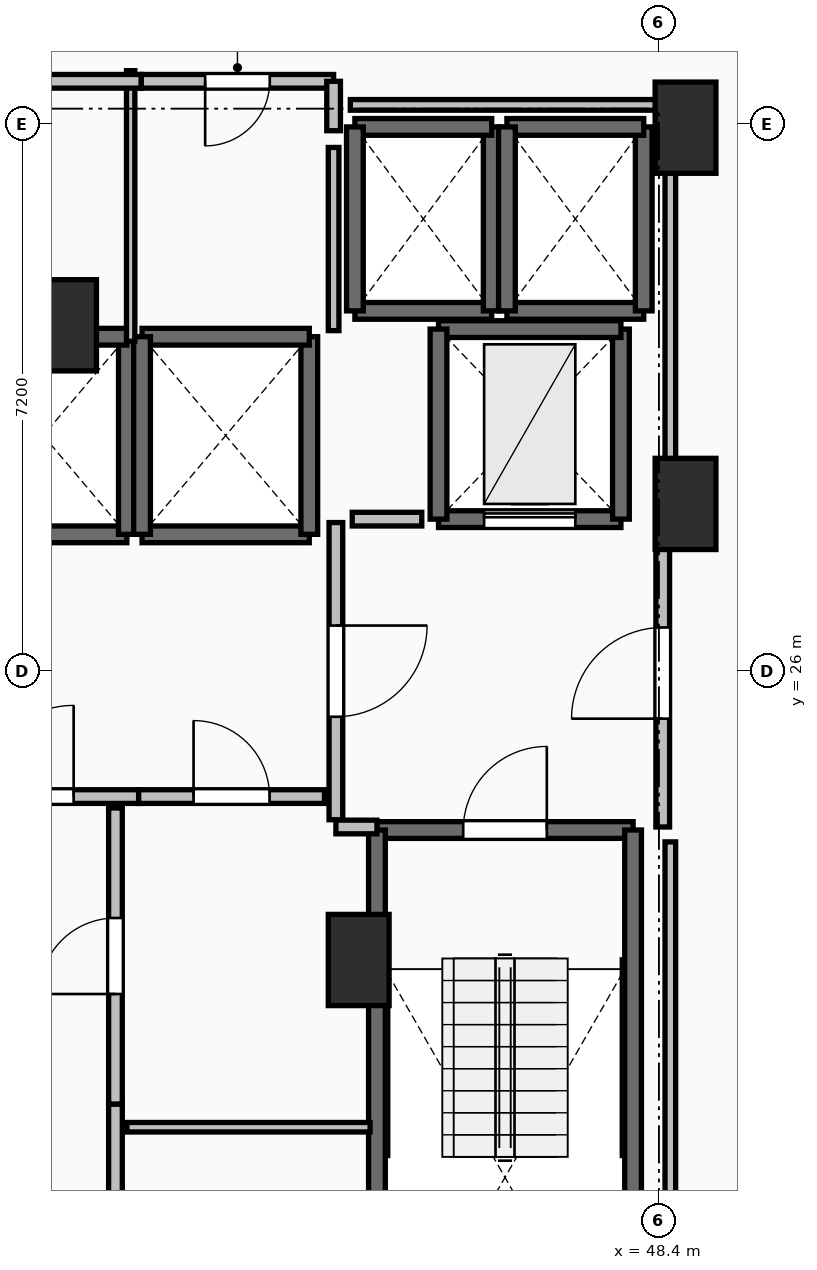
"""IFC4 building model, lengths in metres.
Left out: names, types, materials, properties, quantities, classifications, styles, units other than length and angle.
Written with IfcOpenShell. Run it as: python <this file> out.ifc"""

import sys

from ifc_helpers import new_model, si_unit, direction, frame, frame_2d, origin, origin_2d, place, context, subcontext, project, spatial, rectangle, extrude, element, fill, save


model = new_model("IFC4")
c1 = context("Model", 3, precision=1e-05, world=origin(), true_north=direction((0.0, 1.0)))
c2 = subcontext(c1, "Body", "Model", "MODEL_VIEW")
j1 = project(units=[si_unit("LENGTHUNIT", "METRE"), si_unit("PLANEANGLEUNIT", "RADIAN")], contexts=[c1])
p1 = place(None, origin())
s1 = spatial("IfcSite", under=j1, at=p1, CompositionType="ELEMENT")
p2 = place(p1, origin())
s2 = spatial("IfcBuilding", under=s1, at=p2, CompositionType="ELEMENT")
p3 = place(p2, frame((0.0, 0.0, 132.6)))
s3 = spatial("IfcBuildingStorey", under=s2, at=p3, CompositionType="ELEMENT", Elevation=132.6)
for number, where, z_axis, x_axis in (
    (1, (48.75, 33.15, 0.0), (0.0, 0.0, 1.0), (1.0, 0.0, 0.0)),
    (2, (48.75, 28.2, 0.0), (0.0, 0.0, 1.0), (1.0, 0.0, 0.0)),
    (3, (44.45, 22.2, 0.0), (0.0, 0.0, 1.0), (1.0, 0.0, 0.0)),
    (4, (40.6, 30.55, 0.0), (0.0, 0.0, 1.0), (1.0, 0.0, 0.0)),
):
    element("IfcColumn", number, at=place(p3, frame(where, z_axis=z_axis, x_axis=x_axis)), inside=s3, PredefinedType="PILASTER", context=c2, shape_type="SweptSolid", body=[
        extrude(rectangle(XDim=0.8, YDim=1.2, at=origin_2d()), origin(), (0.0, 0.0, 1.0), 3.5),
    ])
p4 = place(p3, frame((44.69, 23.91, 0.0), z_axis=(0.0, 0.0, 1.0), x_axis=(1.0, 0.0, 0.0)))
e5 = element("IfcWall", 5, at=p4, inside=s3, PredefinedType="SOLIDWALL", context=c2, shape_type="SweptSolid", body=[
    extrude(rectangle(XDim=3.37, YDim=0.22, at=frame_2d((1.685, 0.0))), origin(), (0.0, 0.0, 1.0), 3.24),
])
p5 = place(p4, frame((1.135, 0.0, 0.0)))
e6 = element("IfcOpeningElement", 6, at=p5, cuts=e5, PredefinedType="OPENING", context=c2, shape_type="SweptSolid", body=[
    extrude(rectangle(XDim=1.1, YDim=2.15, at=frame_2d((0.55, 1.075))), frame((0.0, 0.125, 0.0), z_axis=(0.0, -1.0, 0.0), x_axis=(1.0, 0.0, 0.0)), (0.0, 0.0, 1.0), 0.25),
])
for number, where, z_axis, x_axis in (
    (7, (48.06, 23.91, 0.0), (0.0, 0.0, 1.0), (0.0, -1.0, 0.0)),
    (8, (44.69, 16.49, 0.0), (0.0, 0.0, 1.0), (0.0, 1.0, 0.0)),
):
    element("IfcWall", number, at=place(p3, frame(where, z_axis=z_axis, x_axis=x_axis)), inside=s3, PredefinedType="SOLIDWALL", context=c2, shape_type="SweptSolid", body=[
        extrude(rectangle(XDim=7.42, YDim=0.22, at=frame_2d((3.71, 0.0))), origin(), (0.0, 0.0, 1.0), 3.24),
    ])
p6 = place(p3, frame((39.2, 27.8, 0.0), z_axis=(0.0, 0.0, 1.0), x_axis=(1.0, 0.0, 0.0)))
e9 = element("IfcWall", 9, at=p6, inside=s3, PredefinedType="SOLIDWALL", context=c2, shape_type="SweptSolid", body=[
    extrude(rectangle(XDim=2.2, YDim=0.22, at=frame_2d((1.1, 0.0))), origin(), (0.0, 0.0, 1.0), 3.24),
])
p7 = place(p3, frame((41.4, 27.8, 0.0), z_axis=(0.0, 0.0, 1.0), x_axis=(0.0, 1.0, 0.0)))
e10 = element("IfcWall", 10, at=p7, inside=s3, PredefinedType="SOLIDWALL", context=c2, shape_type="SweptSolid", body=[
    extrude(rectangle(XDim=2.6, YDim=0.22, at=frame_2d((1.3, 0.0))), origin(), (0.0, 0.0, 1.0), 3.24),
])
for number, where, z_axis, x_axis in (
    (11, (41.4, 30.4, 0.0), (0.0, 0.0, 1.0), (-1.0, 0.0, 0.0)),
    (12, (41.6, 27.8, 0.0), (0.0, 0.0, 1.0), (1.0, 0.0, 0.0)),
):
    element("IfcWall", number, at=place(p3, frame(where, z_axis=z_axis, x_axis=x_axis)), inside=s3, PredefinedType="SOLIDWALL", context=c2, shape_type="SweptSolid", body=[
        extrude(rectangle(XDim=2.2, YDim=0.22, at=frame_2d((1.1, 0.0))), origin(), (0.0, 0.0, 1.0), 3.24),
    ])
p8 = place(p3, frame((43.8, 27.8, 0.0), z_axis=(0.0, 0.0, 1.0), x_axis=(0.0, 1.0, 0.0)))
e13 = element("IfcWall", 13, at=p8, inside=s3, PredefinedType="SOLIDWALL", context=c2, shape_type="SweptSolid", body=[
    extrude(rectangle(XDim=2.6, YDim=0.22, at=frame_2d((1.3, 0.0))), origin(), (0.0, 0.0, 1.0), 3.24),
])
p9 = place(p3, frame((43.8, 30.4, 0.0), z_axis=(0.0, 0.0, 1.0), x_axis=(-1.0, 0.0, 0.0)))
e14 = element("IfcWall", 14, at=p9, inside=s3, PredefinedType="SOLIDWALL", context=c2, shape_type="SweptSolid", body=[
    extrude(rectangle(XDim=2.2, YDim=0.22, at=frame_2d((1.1, 0.0))), origin(), (0.0, 0.0, 1.0), 3.24),
])
p10 = place(p3, frame((41.6, 30.4, 0.0), z_axis=(0.0, 0.0, 1.0), x_axis=(0.0, -1.0, 0.0)))
e15 = element("IfcWall", 15, at=p10, inside=s3, PredefinedType="SOLIDWALL", context=c2, shape_type="SweptSolid", body=[
    extrude(rectangle(XDim=2.6, YDim=0.22, at=frame_2d((1.3, 0.0))), origin(), (0.0, 0.0, 1.0), 3.24),
])
p11 = place(p3, frame((44.4, 30.74, 0.0), z_axis=(0.0, 0.0, 1.0), x_axis=(1.0, 0.0, 0.0)))
e16 = element("IfcWall", 16, at=p11, inside=s3, PredefinedType="SOLIDWALL", context=c2, shape_type="SweptSolid", body=[
    extrude(rectangle(XDim=1.8, YDim=0.22, at=frame_2d((0.9, 0.0))), origin(), (0.0, 0.0, 1.0), 3.24),
])
p12 = place(p3, frame((46.2, 30.74, 0.0), z_axis=(0.0, 0.0, 1.0), x_axis=(0.0, 1.0, 0.0)))
e17 = element("IfcWall", 17, at=p12, inside=s3, PredefinedType="SOLIDWALL", context=c2, shape_type="SweptSolid", body=[
    extrude(rectangle(XDim=2.42, YDim=0.22, at=frame_2d((1.21, 0.0))), origin(), (0.0, 0.0, 1.0), 3.24),
])
p13 = place(p3, frame((46.2, 33.16, 0.0), z_axis=(0.0, 0.0, 1.0), x_axis=(-1.0, 0.0, 0.0)))
e18 = element("IfcWall", 18, at=p13, inside=s3, PredefinedType="SOLIDWALL", context=c2, shape_type="SweptSolid", body=[
    extrude(rectangle(XDim=1.8, YDim=0.22, at=frame_2d((0.9, 0.0))), origin(), (0.0, 0.0, 1.0), 3.24),
])
p14 = place(p3, frame((44.4, 33.16, 0.0), z_axis=(0.0, 0.0, 1.0), x_axis=(0.0, -1.0, 0.0)))
e19 = element("IfcWall", 19, at=p14, inside=s3, PredefinedType="SOLIDWALL", context=c2, shape_type="SweptSolid", body=[
    extrude(rectangle(XDim=2.42, YDim=0.22, at=frame_2d((1.21, 0.0))), origin(), (0.0, 0.0, 1.0), 3.24),
])
p15 = place(p3, frame((46.4, 30.74, 0.0), z_axis=(0.0, 0.0, 1.0), x_axis=(1.0, 0.0, 0.0)))
e20 = element("IfcWall", 20, at=p15, inside=s3, PredefinedType="SOLIDWALL", context=c2, shape_type="SweptSolid", body=[
    extrude(rectangle(XDim=1.8, YDim=0.22, at=frame_2d((0.9, 0.0))), origin(), (0.0, 0.0, 1.0), 3.24),
])
p16 = place(p3, frame((48.2, 30.74, 0.0), z_axis=(0.0, 0.0, 1.0), x_axis=(0.0, 1.0, 0.0)))
e21 = element("IfcWall", 21, at=p16, inside=s3, PredefinedType="SOLIDWALL", context=c2, shape_type="SweptSolid", body=[
    extrude(rectangle(XDim=2.42, YDim=0.22, at=frame_2d((1.21, 0.0))), origin(), (0.0, 0.0, 1.0), 3.24),
])
p17 = place(p3, frame((48.2, 33.16, 0.0), z_axis=(0.0, 0.0, 1.0), x_axis=(-1.0, 0.0, 0.0)))
e22 = element("IfcWall", 22, at=p17, inside=s3, PredefinedType="SOLIDWALL", context=c2, shape_type="SweptSolid", body=[
    extrude(rectangle(XDim=1.8, YDim=0.22, at=frame_2d((0.9, 0.0))), origin(), (0.0, 0.0, 1.0), 3.24),
])
p18 = place(p3, frame((46.4, 33.16, 0.0), z_axis=(0.0, 0.0, 1.0), x_axis=(0.0, -1.0, 0.0)))
e23 = element("IfcWall", 23, at=p18, inside=s3, PredefinedType="SOLIDWALL", context=c2, shape_type="SweptSolid", body=[
    extrude(rectangle(XDim=2.42, YDim=0.22, at=frame_2d((1.21, 0.0))), origin(), (0.0, 0.0, 1.0), 3.24),
])
p19 = place(p3, frame((45.5, 28.0, 0.0), z_axis=(0.0, 0.0, 1.0), x_axis=(1.0, 0.0, 0.0)))
e24 = element("IfcWall", 24, at=p19, inside=s3, PredefinedType="SHEAR", context=c2, shape_type="SweptSolid", body=[
    extrude(rectangle(XDim=2.4, YDim=0.22, at=frame_2d((1.2, 0.0))), origin(), (0.0, 0.0, 1.0), 3.24),
])
p20 = place(p19, frame((0.6, 0.0, 0.0)))
e25 = element("IfcOpeningElement", 25, at=p20, cuts=e24, PredefinedType="OPENING", context=c2, shape_type="SweptSolid", body=[
    extrude(rectangle(XDim=1.2, YDim=2.2, at=frame_2d((0.6, 1.1))), frame((0.0, 0.125, 0.0), z_axis=(0.0, -1.0, 0.0), x_axis=(1.0, 0.0, 0.0)), (0.0, 0.0, 1.0), 0.25),
])
p21 = place(p3, frame((47.9, 28.0, 0.0), z_axis=(0.0, 0.0, 1.0), x_axis=(0.0, 1.0, 0.0)))
e26 = element("IfcWall", 26, at=p21, inside=s3, PredefinedType="SHEAR", context=c2, shape_type="SweptSolid", body=[
    extrude(rectangle(XDim=2.5, YDim=0.22, at=frame_2d((1.25, 0.0))), origin(), (0.0, 0.0, 1.0), 3.24),
])
p22 = place(p3, frame((47.9, 30.5, 0.0), z_axis=(0.0, 0.0, 1.0), x_axis=(-1.0, 0.0, 0.0)))
e27 = element("IfcWall", 27, at=p22, inside=s3, PredefinedType="SHEAR", context=c2, shape_type="SweptSolid", body=[
    extrude(rectangle(XDim=2.4, YDim=0.22, at=frame_2d((1.2, 0.0))), origin(), (0.0, 0.0, 1.0), 3.24),
])
p23 = place(p3, frame((45.5, 30.5, 0.0), z_axis=(0.0, 0.0, 1.0), x_axis=(0.0, -1.0, 0.0)))
e28 = element("IfcWall", 28, at=p23, inside=s3, PredefinedType="SHEAR", context=c2, shape_type="SweptSolid", body=[
    extrude(rectangle(XDim=2.5, YDim=0.22, at=frame_2d((1.25, 0.0))), origin(), (0.0, 0.0, 1.0), 3.24),
])
p24 = place(p3, frame((44.15, 27.955, 0.0), z_axis=(0.0, 0.0, 1.0), x_axis=(0.0, -1.0, 0.0)))
e29 = element("IfcWall", 29, at=p24, inside=s3, PredefinedType="PARTITIONING", context=c2, shape_type="SweptSolid", body=[
    extrude(rectangle(XDim=3.91, YDim=0.18, at=frame_2d((1.955, 0.0))), origin(), (0.0, 0.0, 1.0), 3.24),
])
p25 = place(p24, frame((1.355, 0.0, 0.0)))
e30 = element("IfcOpeningElement", 30, at=p25, cuts=e29, PredefinedType="OPENING", context=c2, shape_type="SweptSolid", body=[
    extrude(rectangle(XDim=1.2, YDim=2.15, at=frame_2d((0.6, 1.075))), frame((0.0, 0.105, 0.0), z_axis=(0.0, -1.0, 0.0), x_axis=(1.0, 0.0, 0.0)), (0.0, 0.0, 1.0), 0.21),
])
p26 = place(p3, frame((44.15, 23.95, 0.0), z_axis=(0.0, 0.0, 1.0), x_axis=(1.0, 0.0, 0.0)))
e31 = element("IfcWall", 31, at=p26, inside=s3, PredefinedType="PARTITIONING", context=c2, shape_type="SweptSolid", body=[
    extrude(rectangle(XDim=0.54, YDim=0.18, at=frame_2d((0.27, 0.0))), origin(), (0.0, 0.0, 1.0), 3.24),
])
p27 = place(p3, frame((48.45, 23.95, 0.0), z_axis=(0.0, 0.0, 1.0), x_axis=(0.0, 1.0, 0.0)))
e32 = element("IfcWall", 32, at=p27, inside=s3, PredefinedType="PARTITIONING", context=c2, shape_type="SweptSolid", body=[
    extrude(rectangle(XDim=4.05, YDim=0.18, at=frame_2d((2.025, 0.0))), origin(), (0.0, 0.0, 1.0), 3.24),
])
p28 = place(p27, frame((1.425, 0.0, 0.0)))
e33 = element("IfcOpeningElement", 33, at=p28, cuts=e32, PredefinedType="OPENING", context=c2, shape_type="SweptSolid", body=[
    extrude(rectangle(XDim=1.2, YDim=2.15, at=frame_2d((0.6, 1.075))), frame((0.0, 0.105, 0.0), z_axis=(0.0, -1.0, 0.0), x_axis=(1.0, 0.0, 0.0)), (0.0, 0.0, 1.0), 0.21),
])
p29 = place(p3, frame((38.645, 24.35, 0.0), z_axis=(0.0, 0.0, 1.0), x_axis=(1.0, 0.0, 0.0)))
e34 = element("IfcWall", 34, at=p29, inside=s3, PredefinedType="PARTITIONING", context=c2, shape_type="SweptSolid", body=[
    extrude(rectangle(XDim=2.91, YDim=0.18, at=frame_2d((1.455, 0.0))), origin(), (0.0, 0.0, 1.0), 3.24),
])
p30 = place(p29, frame((0.855, 0.0, 0.0)))
e35 = element("IfcOpeningElement", 35, at=p30, cuts=e34, PredefinedType="OPENING", context=c2, shape_type="SweptSolid", body=[
    extrude(rectangle(XDim=1.2, YDim=2.15, at=frame_2d((0.6, 1.075))), frame((0.0, 0.105, 0.0), z_axis=(0.0, -1.0, 0.0), x_axis=(1.0, 0.0, 0.0)), (0.0, 0.0, 1.0), 0.21),
])
p31 = place(p3, frame((41.555, 24.35, 0.0), z_axis=(0.0, 0.0, 1.0), x_axis=(1.0, 0.0, 0.0)))
e36 = element("IfcWall", 36, at=p31, inside=s3, PredefinedType="PARTITIONING", context=c2, shape_type="SweptSolid", body=[
    extrude(rectangle(XDim=2.445, YDim=0.18, at=frame_2d((1.223, 0.0))), origin(), (0.0, 0.0, 1.0), 3.24),
])
p32 = place(p31, frame((0.722, 0.0, 0.0)))
e37 = element("IfcOpeningElement", 37, at=p32, cuts=e36, PredefinedType="OPENING", context=c2, shape_type="SweptSolid", body=[
    extrude(rectangle(XDim=1.0, YDim=2.15, at=frame_2d((0.5, 1.075))), frame((0.0, 0.105, 0.0), z_axis=(0.0, -1.0, 0.0), x_axis=(1.0, 0.0, 0.0)), (0.0, 0.0, 1.0), 0.21),
])
p33 = place(p3, frame((41.25, 16.32, 0.0), z_axis=(0.0, 0.0, 1.0), x_axis=(0.0, 1.0, 0.0)))
e38 = element("IfcWall", 38, at=p33, inside=s3, PredefinedType="PARTITIONING", context=c2, shape_type="SweptSolid", body=[
    extrude(rectangle(XDim=3.985, YDim=0.18, at=frame_2d((1.992, 0.0))), origin(), (0.0, 0.0, 1.0), 3.24),
])
p34 = place(p33, frame((1.593, 0.0, 0.0)))
e39 = element("IfcOpeningElement", 39, at=p34, cuts=e38, PredefinedType="OPENING", context=c2, shape_type="SweptSolid", body=[
    extrude(rectangle(XDim=0.8, YDim=2.05, at=frame_2d((0.4, 1.025))), frame((0.0, 0.105, 0.0), z_axis=(0.0, -1.0, 0.0), x_axis=(1.0, 0.0, 0.0)), (0.0, 0.0, 1.0), 0.21),
])
p35 = place(p3, frame((41.25, 20.305, 0.0), z_axis=(0.0, 0.0, 1.0), x_axis=(0.0, 1.0, 0.0)))
e40 = element("IfcWall", 40, at=p35, inside=s3, PredefinedType="PARTITIONING", context=c2, shape_type="SweptSolid", body=[
    extrude(rectangle(XDim=3.895, YDim=0.18, at=frame_2d((1.948, 0.0))), origin(), (0.0, 0.0, 1.0), 3.24),
])
p36 = place(p35, frame((1.448, 0.0, 0.0)))
e41 = element("IfcOpeningElement", 41, at=p36, cuts=e40, PredefinedType="OPENING", context=c2, shape_type="SweptSolid", body=[
    extrude(rectangle(XDim=1.0, YDim=2.15, at=frame_2d((0.5, 1.075))), frame((0.0, 0.105, 0.0), z_axis=(0.0, -1.0, 0.0), x_axis=(1.0, 0.0, 0.0)), (0.0, 0.0, 1.0), 0.21),
])
p37 = place(p3, frame((44.6, 20.0, 0.0), z_axis=(0.0, 0.0, 1.0), x_axis=(-1.0, 0.0, 0.0)))
e42 = element("IfcWall", 42, at=p37, inside=s3, PredefinedType="PARTITIONING", context=c2, shape_type="SweptSolid", body=[
    extrude(rectangle(XDim=3.2, YDim=0.125, at=frame_2d((1.6, 0.0))), origin(), (0.0, 0.0, 1.0), 3.24),
])
p38 = place(p3, frame((41.45, 30.34, 0.0), z_axis=(0.0, 0.0, 1.0), x_axis=(0.0, 1.0, 0.0)))
e43 = element("IfcWall", 43, at=p38, inside=s3, PredefinedType="PARTITIONING", context=c2, shape_type="SweptSolid", body=[
    extrude(rectangle(XDim=3.56, YDim=0.11, at=frame_2d((1.78, 0.0))), origin(), (0.0, 0.0, 1.0), 3.24),
])
p39 = place(p3, frame((41.59, 33.76, 0.0), z_axis=(0.0, 0.0, 1.0), x_axis=(-1.0, 0.0, 0.0)))
e44 = element("IfcWall", 44, at=p39, inside=s3, PredefinedType="PARTITIONING", context=c2, shape_type="SweptSolid", body=[
    extrude(rectangle(XDim=3.44, YDim=0.18, at=frame_2d((1.72, 0.0))), origin(), (0.0, 0.0, 1.0), 3.24),
])
p40 = place(p39, frame((1.295, 0.0, 0.0)))
e45 = element("IfcOpeningElement", 45, at=p40, cuts=e44, PredefinedType="OPENING", context=c2, shape_type="SweptSolid", body=[
    extrude(rectangle(XDim=0.85, YDim=2.1, at=frame_2d((0.425, 1.05))), frame((0.0, 0.105, 0.0), z_axis=(0.0, -1.0, 0.0), x_axis=(1.0, 0.0, 0.0)), (0.0, 0.0, 1.0), 0.21),
])
p41 = place(p3, frame((44.12, 33.76, 0.0), z_axis=(0.0, 0.0, 1.0), x_axis=(-1.0, 0.0, 0.0)))
e46 = element("IfcWall", 46, at=p41, inside=s3, PredefinedType="PARTITIONING", context=c2, shape_type="SweptSolid", body=[
    extrude(rectangle(XDim=2.53, YDim=0.18, at=frame_2d((1.265, 0.0))), origin(), (0.0, 0.0, 1.0), 3.24),
])
p42 = place(p41, frame((0.84, 0.0, 0.0)))
e47 = element("IfcOpeningElement", 47, at=p42, cuts=e46, PredefinedType="OPENING", context=c2, shape_type="SweptSolid", body=[
    extrude(rectangle(XDim=0.85, YDim=2.1, at=frame_2d((0.425, 1.05))), frame((0.0, 0.105, 0.0), z_axis=(0.0, -1.0, 0.0), x_axis=(1.0, 0.0, 0.0)), (0.0, 0.0, 1.0), 0.21),
])
p43 = place(p3, frame((44.12, 33.11, 0.0), z_axis=(0.0, 0.0, 1.0), x_axis=(0.0, 1.0, 0.0)))
e48 = element("IfcWall", 48, at=p43, inside=s3, PredefinedType="PARTITIONING", context=c2, shape_type="SweptSolid", body=[
    extrude(rectangle(XDim=0.65, YDim=0.18, at=frame_2d((0.325, 0.0))), origin(), (0.0, 0.0, 1.0), 3.24),
])
p44 = place(p3, frame((45.28, 28.0, 0.0), z_axis=(0.0, 0.0, 1.0), x_axis=(-1.0, 0.0, 0.0)))
e49 = element("IfcWall", 49, at=p44, inside=s3, PredefinedType="PARTITIONING", context=c2, shape_type="SweptSolid", body=[
    extrude(rectangle(XDim=0.915, YDim=0.18, at=frame_2d((0.458, 0.0))), origin(), (0.0, 0.0, 1.0), 3.24),
])
p45 = place(p3, frame((44.12, 30.48, 0.0), z_axis=(0.0, 0.0, 1.0), x_axis=(0.0, 1.0, 0.0)))
e50 = element("IfcWall", 50, at=p45, inside=s3, PredefinedType="PARTITIONING", context=c2, shape_type="SweptSolid", body=[
    extrude(rectangle(XDim=2.41, YDim=0.14, at=frame_2d((1.205, 0.0))), origin(), (0.0, 0.0, 1.0), 3.24),
])
p46 = place(p3, frame((48.55, 28.196, 0.0), z_axis=(0.0, 0.0, 1.0), x_axis=(0.0, 1.0, 0.0)))
e51 = element("IfcWall", 51, at=p46, inside=s3, PredefinedType="PARTITIONING", context=c2, shape_type="SweptSolid", body=[
    extrude(rectangle(XDim=5.254, YDim=0.14, at=frame_2d((2.627, 0.0))), origin(), (0.0, 0.0, 1.0), 2.432),
])
p47 = place(p3, frame((48.55, 33.45, 0.0), z_axis=(0.0, 0.0, 1.0), x_axis=(-1.0, 0.0, 0.0)))
e52 = element("IfcWall", 52, at=p47, inside=s3, PredefinedType="PARTITIONING", context=c2, shape_type="SweptSolid", body=[
    extrude(rectangle(XDim=4.21, YDim=0.14, at=frame_2d((2.105, 0.0))), origin(), (0.0, 0.0, 1.0), 2.432),
])
p48 = place(p3, frame((48.55, 16.24, 0.0), z_axis=(0.0, 0.0, 1.0), x_axis=(0.0, 1.0, 0.0)))
e53 = element("IfcWall", 53, at=p48, inside=s3, PredefinedType="PARTITIONING", context=c2, shape_type="SweptSolid", body=[
    extrude(rectangle(XDim=7.514, YDim=0.14, at=frame_2d((3.757, 0.0))), origin(), (0.0, 0.0, 1.0), 2.432),
])
p49 = place(p5, origin())
e54 = element("IfcDoor", 54, at=p49, inside=s3, OperationType="SINGLE_SWING_RIGHT", PredefinedType="DOOR", context=c2, shape_type="SweptSolid", body=[
    extrude(rectangle(XDim=1.1, YDim=2.15, at=frame_2d((0.55, 1.075))), frame((0.0, 0.025, 0.0), z_axis=(0.0, -1.0, 0.0), x_axis=(1.0, 0.0, 0.0)), (0.0, 0.0, 1.0), 0.05),
])
fill(e6, e54)
p50 = place(p20, origin())
e55 = element("IfcDoor", 55, at=p50, inside=s3, OperationType="SLIDING_TO_LEFT", PredefinedType="DOOR", context=c2, shape_type="SweptSolid", body=[
    extrude(rectangle(XDim=1.2, YDim=2.2, at=frame_2d((0.6, 1.1))), frame((0.0, 0.025, 0.0), z_axis=(0.0, -1.0, 0.0), x_axis=(1.0, 0.0, 0.0)), (0.0, 0.0, 1.0), 0.05),
])
fill(e25, e55)
p51 = place(p25, origin())
e56 = element("IfcDoor", 56, at=p51, inside=s3, OperationType="SINGLE_SWING_LEFT", PredefinedType="DOOR", context=c2, shape_type="SweptSolid", body=[
    extrude(rectangle(XDim=1.2, YDim=2.15, at=frame_2d((0.6, 1.075))), frame((0.0, 0.025, 0.0), z_axis=(0.0, -1.0, 0.0), x_axis=(1.0, 0.0, 0.0)), (0.0, 0.0, 1.0), 0.05),
])
fill(e30, e56)
p52 = place(p28, origin())
e57 = element("IfcDoor", 57, at=p52, inside=s3, OperationType="SINGLE_SWING_LEFT", PredefinedType="DOOR", context=c2, shape_type="SweptSolid", body=[
    extrude(rectangle(XDim=1.2, YDim=2.15, at=frame_2d((0.6, 1.075))), frame((0.0, 0.025, 0.0), z_axis=(0.0, -1.0, 0.0), x_axis=(1.0, 0.0, 0.0)), (0.0, 0.0, 1.0), 0.05),
])
fill(e33, e57)
p53 = place(p30, origin())
e58 = element("IfcDoor", 58, at=p53, inside=s3, OperationType="SINGLE_SWING_RIGHT", PredefinedType="DOOR", context=c2, shape_type="SweptSolid", body=[
    extrude(rectangle(XDim=1.2, YDim=2.15, at=frame_2d((0.6, 1.075))), frame((0.0, 0.025, 0.0), z_axis=(0.0, -1.0, 0.0), x_axis=(1.0, 0.0, 0.0)), (0.0, 0.0, 1.0), 0.05),
])
fill(e35, e58)
p54 = place(p32, origin())
e59 = element("IfcDoor", 59, at=p54, inside=s3, OperationType="SINGLE_SWING_LEFT", PredefinedType="DOOR", context=c2, shape_type="SweptSolid", body=[
    extrude(rectangle(XDim=1.0, YDim=2.15, at=frame_2d((0.5, 1.075))), frame((0.0, 0.025, 0.0), z_axis=(0.0, -1.0, 0.0), x_axis=(1.0, 0.0, 0.0)), (0.0, 0.0, 1.0), 0.05),
])
fill(e37, e59)
p55 = place(p36, origin())
e60 = element("IfcDoor", 60, at=p55, inside=s3, OperationType="SINGLE_SWING_LEFT", PredefinedType="DOOR", context=c2, shape_type="SweptSolid", body=[
    extrude(rectangle(XDim=1.0, YDim=2.15, at=frame_2d((0.5, 1.075))), frame((0.0, 0.025, 0.0), z_axis=(0.0, -1.0, 0.0), x_axis=(1.0, 0.0, 0.0)), (0.0, 0.0, 1.0), 0.05),
])
fill(e41, e60)
p56 = place(p42, origin())
e61 = element("IfcDoor", 61, at=p56, inside=s3, OperationType="SINGLE_SWING_RIGHT", PredefinedType="DOOR", context=c2, shape_type="SweptSolid", body=[
    extrude(rectangle(XDim=0.85, YDim=2.1, at=frame_2d((0.425, 1.05))), frame((0.0, 0.025, 0.0), z_axis=(0.0, -1.0, 0.0), x_axis=(1.0, 0.0, 0.0)), (0.0, 0.0, 1.0), 0.05),
])
fill(e47, e61)
save(model, sys.argv[1])
